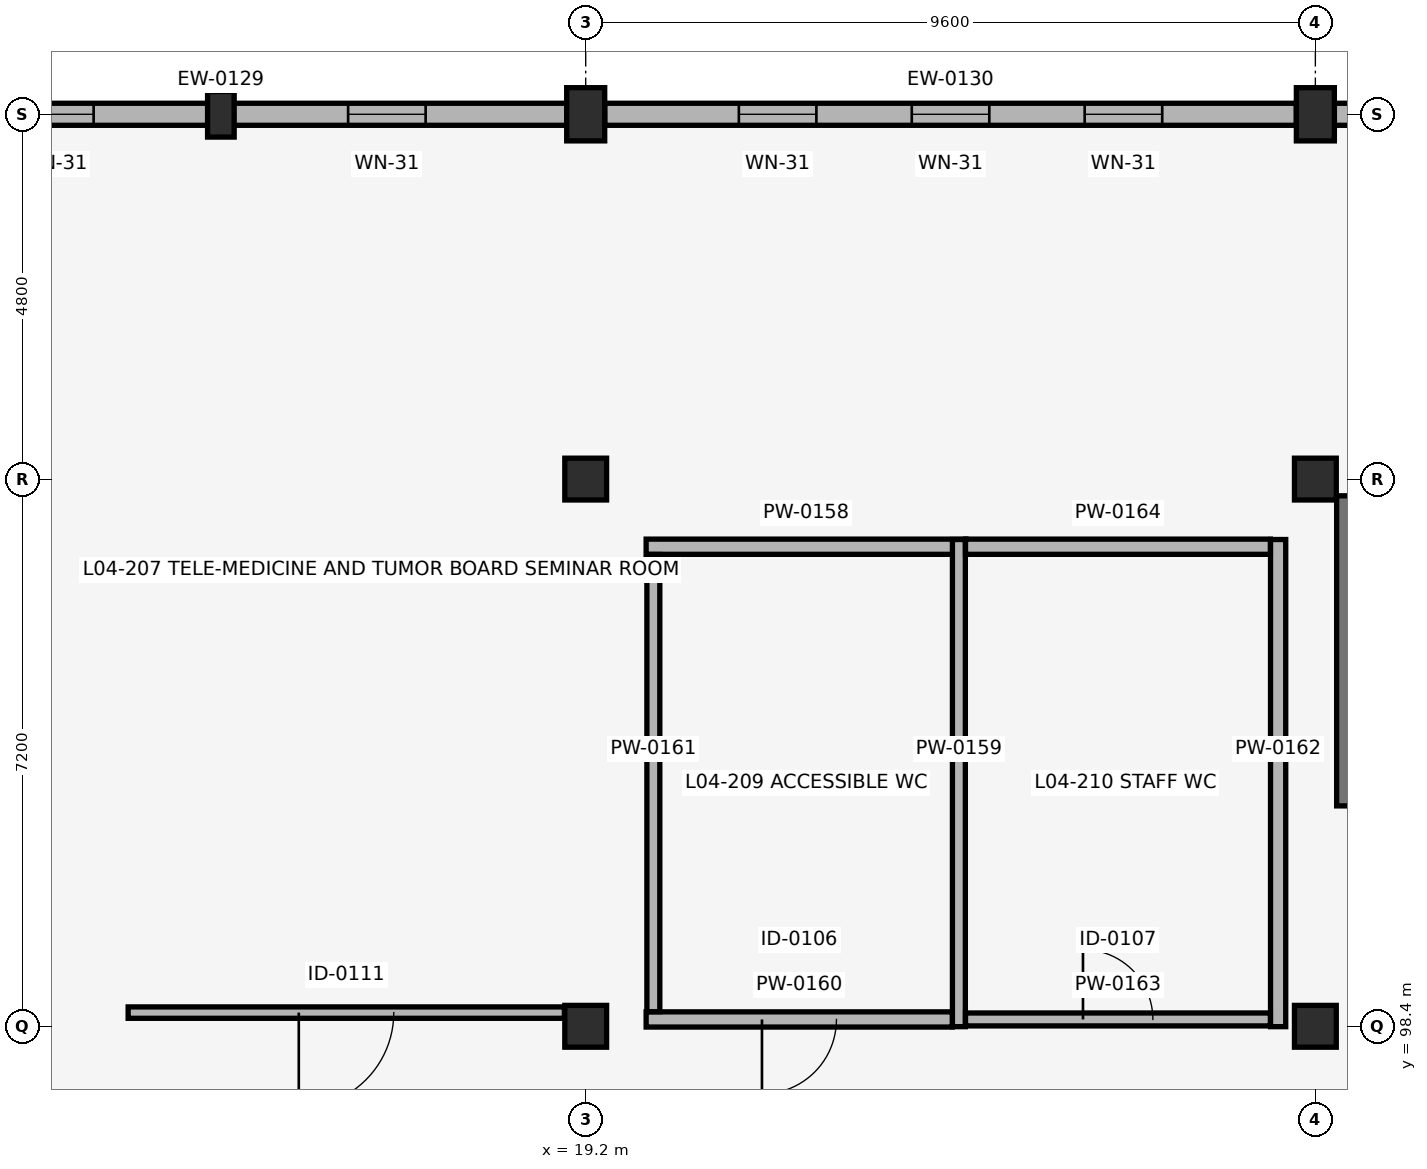
"""IFC4 building model, lengths in metres.
Left out: names, types, materials, properties, quantities, classifications, styles, units other than length and angle.
Written with IfcOpenShell. Run it as: python <this file> out.ifc"""

import sys

from ifc_helpers import new_model, si_unit, direction, frame, frame_2d, origin, origin_2d, place, context, subcontext, project, spatial, rectangle, extrude, element, fill, save


model = new_model("IFC4")
c1 = context("Model", 3, precision=1e-05, world=origin(), true_north=direction((0.0, 1.0)))
c2 = subcontext(c1, "Body", "Model", "MODEL_VIEW")
j1 = project(units=[si_unit("LENGTHUNIT", "METRE"), si_unit("PLANEANGLEUNIT", "RADIAN")], contexts=[c1])
p1 = place(None, origin())
s1 = spatial("IfcSite", under=j1, at=p1, CompositionType="ELEMENT")
p2 = place(p1, origin())
s2 = spatial("IfcBuilding", under=s1, at=p2, CompositionType="ELEMENT")
p3 = place(p2, frame((0.0, 0.0, 16.66)))
s3 = spatial("IfcBuildingStorey", under=s2, at=p3, CompositionType="ELEMENT", Elevation=16.66)
for number, where, z_axis, x_axis in (
    (1, (19.2, 98.4, 0.0), (0.0, 0.0, 1.0), (1.0, 0.0, 0.0)),
    (2, (19.2, 105.6, 0.0), (0.0, 0.0, 1.0), (1.0, 0.0, 0.0)),
):
    element("IfcColumn", number, at=place(p3, frame(where, z_axis=z_axis, x_axis=x_axis)), inside=s3, PredefinedType="COLUMN", context=c2, shape_type="SweptSolid", body=[
        extrude(rectangle(XDim=0.55, YDim=0.55, at=origin_2d()), origin(), (0.0, 0.0, 1.0), 4.08),
    ])
p4 = place(p3, frame((19.2, 110.4, 0.0), z_axis=(0.0, 0.0, 1.0), x_axis=(1.0, 0.0, 0.0)))
e3 = element("IfcColumn", 3, at=p4, inside=s3, PredefinedType="COLUMN", context=c2, shape_type="SweptSolid", body=[
    extrude(rectangle(XDim=0.5, YDim=0.7, at=origin_2d()), origin(), (0.0, 0.0, 1.0), 4.08),
])
for number, where, z_axis, x_axis in (
    (4, (28.8, 98.4, 0.0), (0.0, 0.0, 1.0), (1.0, 0.0, 0.0)),
    (5, (28.8, 105.6, 0.0), (0.0, 0.0, 1.0), (1.0, 0.0, 0.0)),
):
    element("IfcColumn", number, at=place(p3, frame(where, z_axis=z_axis, x_axis=x_axis)), inside=s3, PredefinedType="COLUMN", context=c2, shape_type="SweptSolid", body=[
        extrude(rectangle(XDim=0.55, YDim=0.55, at=origin_2d()), origin(), (0.0, 0.0, 1.0), 4.08),
    ])
p5 = place(p3, frame((28.8, 110.4, 0.0), z_axis=(0.0, 0.0, 1.0), x_axis=(1.0, 0.0, 0.0)))
e6 = element("IfcColumn", 6, at=p5, inside=s3, PredefinedType="COLUMN", context=c2, shape_type="SweptSolid", body=[
    extrude(rectangle(XDim=0.5, YDim=0.7, at=origin_2d()), origin(), (0.0, 0.0, 1.0), 4.08),
])
p6 = place(p3, frame((14.4, 110.4, 0.0), z_axis=(0.0, 0.0, 1.0), x_axis=(1.0, 0.0, 0.0)))
e7 = element("IfcColumn", 7, at=p6, inside=s3, PredefinedType="PILASTER", context=c2, shape_type="SweptSolid", body=[
    extrude(rectangle(XDim=0.35, YDim=0.6, at=origin_2d()), origin(), (0.0, 0.0, 1.0), 4.08),
])
p7 = place(p3, frame((18.95, 110.4, 0.0), z_axis=(0.0, 0.0, 1.0), x_axis=(-1.0, 0.0, 0.0)))
e8 = element("IfcWall", 8, at=p7, inside=s3, PredefinedType="SOLIDWALL", context=c2, shape_type="SweptSolid", body=[
    extrude(rectangle(XDim=9.1, YDim=0.29, at=frame_2d((4.55, 0.0))), origin(), (0.0, 0.0, 1.0), 3.08),
])
p8 = place(p7, frame((1.856, 0.0, 0.88)))
e9 = element("IfcOpeningElement", 9, at=p8, cuts=e8, PredefinedType="OPENING", context=c2, shape_type="SweptSolid", body=[
    extrude(rectangle(XDim=1.02, YDim=1.88, at=frame_2d((0.51, 0.94))), frame((0.0, 0.155, 0.0), z_axis=(0.0, -1.0, 0.0), x_axis=(1.0, 0.0, 0.0)), (0.0, 0.0, 1.0), 0.31),
])
p9 = place(p7, frame((6.224, 0.0, 0.88)))
e10 = element("IfcOpeningElement", 10, at=p9, cuts=e8, PredefinedType="OPENING", context=c2, shape_type="SweptSolid", body=[
    extrude(rectangle(XDim=1.02, YDim=1.88, at=frame_2d((0.51, 0.94))), frame((0.0, 0.155, 0.0), z_axis=(0.0, -1.0, 0.0), x_axis=(1.0, 0.0, 0.0)), (0.0, 0.0, 1.0), 0.31),
])
p10 = place(p3, frame((28.55, 110.4, 0.0), z_axis=(0.0, 0.0, 1.0), x_axis=(-1.0, 0.0, 0.0)))
e11 = element("IfcWall", 11, at=p10, inside=s3, PredefinedType="SOLIDWALL", context=c2, shape_type="SweptSolid", body=[
    extrude(rectangle(XDim=9.1, YDim=0.29, at=frame_2d((4.55, 0.0))), origin(), (0.0, 0.0, 1.0), 3.08),
])
p11 = place(p10, frame((1.765, 0.0, 0.88)))
e12 = element("IfcOpeningElement", 12, at=p11, cuts=e11, PredefinedType="OPENING", context=c2, shape_type="SweptSolid", body=[
    extrude(rectangle(XDim=1.02, YDim=1.88, at=frame_2d((0.51, 0.94))), frame((0.0, 0.155, 0.0), z_axis=(0.0, -1.0, 0.0), x_axis=(1.0, 0.0, 0.0)), (0.0, 0.0, 1.0), 0.31),
])
p12 = place(p10, frame((4.04, 0.0, 0.88)))
e13 = element("IfcOpeningElement", 13, at=p12, cuts=e11, PredefinedType="OPENING", context=c2, shape_type="SweptSolid", body=[
    extrude(rectangle(XDim=1.02, YDim=1.88, at=frame_2d((0.51, 0.94))), frame((0.0, 0.155, 0.0), z_axis=(0.0, -1.0, 0.0), x_axis=(1.0, 0.0, 0.0)), (0.0, 0.0, 1.0), 0.31),
])
p13 = place(p10, frame((6.315, 0.0, 0.88)))
e14 = element("IfcOpeningElement", 14, at=p13, cuts=e11, PredefinedType="OPENING", context=c2, shape_type="SweptSolid", body=[
    extrude(rectangle(XDim=1.02, YDim=1.88, at=frame_2d((0.51, 0.94))), frame((0.0, 0.155, 0.0), z_axis=(0.0, -1.0, 0.0), x_axis=(1.0, 0.0, 0.0)), (0.0, 0.0, 1.0), 0.31),
])
p14 = place(p3, frame((38.15, 110.4, 0.0), z_axis=(0.0, 0.0, 1.0), x_axis=(-1.0, 0.0, 0.0)))
e15 = element("IfcWall", 15, at=p14, inside=s3, PredefinedType="SOLIDWALL", context=c2, shape_type="SweptSolid", body=[
    extrude(rectangle(XDim=9.1, YDim=0.29, at=frame_2d((4.55, 0.0))), origin(), (0.0, 0.0, 1.0), 3.08),
])
p15 = place(p14, frame((1.856, 0.0, 0.88)))
e16 = element("IfcOpeningElement", 16, at=p15, cuts=e15, PredefinedType="OPENING", context=c2, shape_type="SweptSolid", body=[
    extrude(rectangle(XDim=1.02, YDim=1.88, at=frame_2d((0.51, 0.94))), frame((0.0, 0.155, 0.0), z_axis=(0.0, -1.0, 0.0), x_axis=(1.0, 0.0, 0.0)), (0.0, 0.0, 1.0), 0.31),
])
p16 = place(p14, frame((6.224, 0.0, 0.88)))
e17 = element("IfcOpeningElement", 17, at=p16, cuts=e15, PredefinedType="OPENING", context=c2, shape_type="SweptSolid", body=[
    extrude(rectangle(XDim=1.02, YDim=1.88, at=frame_2d((0.51, 0.94))), frame((0.0, 0.155, 0.0), z_axis=(0.0, -1.0, 0.0), x_axis=(1.0, 0.0, 0.0)), (0.0, 0.0, 1.0), 0.31),
])
p17 = place(p3, frame((29.22, 101.3, 0.0), z_axis=(0.0, 0.0, 1.0), x_axis=(0.0, 1.0, 0.0)))
e18 = element("IfcWall", 18, at=p17, inside=s3, PredefinedType="SHEAR", context=c2, shape_type="SweptSolid", body=[
    extrude(rectangle(XDim=4.08, YDim=0.28, at=frame_2d((2.04, 0.0))), origin(), (0.0, 0.0, 1.0), 3.8),
])
p18 = place(p3, frame((19.995, 104.71, 0.0), z_axis=(0.0, 0.0, 1.0), x_axis=(1.0, 0.0, 0.0)))
e19 = element("IfcWall", 19, at=p18, inside=s3, PredefinedType="PLUMBINGWALL", context=c2, shape_type="SweptSolid", body=[
    extrude(rectangle(XDim=4.21, YDim=0.2, at=frame_2d((2.105, 0.0))), origin(), (0.0, 0.0, 1.0), 3.12),
])
p19 = place(p3, frame((24.11, 98.395, 0.0), z_axis=(0.0, 0.0, 1.0), x_axis=(0.0, 1.0, 0.0)))
e20 = element("IfcWall", 20, at=p19, inside=s3, PredefinedType="PLUMBINGWALL", context=c2, shape_type="SweptSolid", body=[
    extrude(rectangle(XDim=6.41, YDim=0.17, at=frame_2d((3.205, 0.0))), origin(), (0.0, 0.0, 1.0), 3.12),
])
p20 = place(p3, frame((19.995, 98.49, 0.0), z_axis=(0.0, 0.0, 1.0), x_axis=(1.0, 0.0, 0.0)))
e21 = element("IfcWall", 21, at=p20, inside=s3, PredefinedType="PLUMBINGWALL", context=c2, shape_type="SweptSolid", body=[
    extrude(rectangle(XDim=4.028, YDim=0.2, at=frame_2d((2.014, 0.0))), origin(), (0.0, 0.0, 1.0), 3.12),
])
p21 = place(p20, frame((1.524, 0.0, 0.0)))
e22 = element("IfcOpeningElement", 22, at=p21, cuts=e21, PredefinedType="OPENING", context=c2, shape_type="SweptSolid", body=[
    extrude(rectangle(XDim=0.98, YDim=2.08, at=frame_2d((0.49, 1.04))), frame((0.0, 0.11, 0.0), z_axis=(0.0, -1.0, 0.0), x_axis=(1.0, 0.0, 0.0)), (0.0, 0.0, 1.0), 0.22),
])
p22 = place(p3, frame((20.09, 98.592, 0.0), z_axis=(0.0, 0.0, 1.0), x_axis=(0.0, 1.0, 0.0)))
e23 = element("IfcWall", 23, at=p22, inside=s3, PredefinedType="PLUMBINGWALL", context=c2, shape_type="SweptSolid", body=[
    extrude(rectangle(XDim=6.016, YDim=0.17, at=frame_2d((3.008, 0.0))), origin(), (0.0, 0.0, 1.0), 3.12),
])
p23 = place(p3, frame((28.31, 98.395, 0.0), z_axis=(0.0, 0.0, 1.0), x_axis=(0.0, 1.0, 0.0)))
e24 = element("IfcWall", 24, at=p23, inside=s3, PredefinedType="PLUMBINGWALL", context=c2, shape_type="SweptSolid", body=[
    extrude(rectangle(XDim=6.41, YDim=0.2, at=frame_2d((3.205, 0.0))), origin(), (0.0, 0.0, 1.0), 3.12),
])
p24 = place(p3, frame((24.197, 98.49, 0.0), z_axis=(0.0, 0.0, 1.0), x_axis=(1.0, 0.0, 0.0)))
e25 = element("IfcWall", 25, at=p24, inside=s3, PredefinedType="PLUMBINGWALL", context=c2, shape_type="SweptSolid", body=[
    extrude(rectangle(XDim=4.011, YDim=0.17, at=frame_2d((2.005, 0.0))), origin(), (0.0, 0.0, 1.0), 3.12),
])
p25 = place(p24, frame((1.545, 0.0, 0.0)))
e26 = element("IfcOpeningElement", 26, at=p25, cuts=e25, PredefinedType="OPENING", context=c2, shape_type="SweptSolid", body=[
    extrude(rectangle(XDim=0.92, YDim=2.08, at=frame_2d((0.46, 1.04))), frame((0.0, 0.095, 0.0), z_axis=(0.0, -1.0, 0.0), x_axis=(1.0, 0.0, 0.0)), (0.0, 0.0, 1.0), 0.19),
])
p26 = place(p3, frame((24.197, 104.71, 0.0), z_axis=(0.0, 0.0, 1.0), x_axis=(1.0, 0.0, 0.0)))
e27 = element("IfcWall", 27, at=p26, inside=s3, PredefinedType="PLUMBINGWALL", context=c2, shape_type="SweptSolid", body=[
    extrude(rectangle(XDim=4.011, YDim=0.2, at=frame_2d((2.005, 0.0))), origin(), (0.0, 0.0, 1.0), 3.12),
])
p27 = place(p3, frame((13.18, 98.58, 0.0), z_axis=(0.0, 0.0, 1.0), x_axis=(1.0, 0.0, 0.0)))
e28 = element("IfcWall", 28, at=p27, inside=s3, PredefinedType="PARTITIONING", context=c2, shape_type="SweptSolid", body=[
    extrude(rectangle(XDim=5.74, YDim=0.15, at=frame_2d((2.87, 0.0))), origin(), (0.0, 0.0, 1.0), 3.12),
])
p28 = place(p27, frame((2.245, 0.0, 0.0)))
e29 = element("IfcOpeningElement", 29, at=p28, cuts=e28, PredefinedType="OPENING", context=c2, shape_type="SweptSolid", body=[
    extrude(rectangle(XDim=1.25, YDim=2.12, at=frame_2d((0.625, 1.06))), frame((0.0, 0.085, 0.0), z_axis=(0.0, -1.0, 0.0), x_axis=(1.0, 0.0, 0.0)), (0.0, 0.0, 1.0), 0.17),
])
p29 = place(p8, origin())
e30 = element("IfcWindow", 30, at=p29, inside=s3, PartitioningType="SINGLE_PANEL", PredefinedType="WINDOW", context=c2, shape_type="SweptSolid", body=[
    extrude(rectangle(XDim=1.02, YDim=1.88, at=frame_2d((0.51, 0.94))), frame((0.0, 0.03, 0.0), z_axis=(0.0, -1.0, 0.0), x_axis=(1.0, 0.0, 0.0)), (0.0, 0.0, 1.0), 0.06),
])
fill(e9, e30)
p30 = place(p9, origin())
e31 = element("IfcWindow", 31, at=p30, inside=s3, PartitioningType="SINGLE_PANEL", PredefinedType="WINDOW", context=c2, shape_type="SweptSolid", body=[
    extrude(rectangle(XDim=1.02, YDim=1.88, at=frame_2d((0.51, 0.94))), frame((0.0, 0.03, 0.0), z_axis=(0.0, -1.0, 0.0), x_axis=(1.0, 0.0, 0.0)), (0.0, 0.0, 1.0), 0.06),
])
fill(e10, e31)
p31 = place(p11, origin())
e32 = element("IfcWindow", 32, at=p31, inside=s3, PartitioningType="SINGLE_PANEL", PredefinedType="WINDOW", context=c2, shape_type="SweptSolid", body=[
    extrude(rectangle(XDim=1.02, YDim=1.88, at=frame_2d((0.51, 0.94))), frame((0.0, 0.03, 0.0), z_axis=(0.0, -1.0, 0.0), x_axis=(1.0, 0.0, 0.0)), (0.0, 0.0, 1.0), 0.06),
])
fill(e12, e32)
p32 = place(p12, origin())
e33 = element("IfcWindow", 33, at=p32, inside=s3, PartitioningType="SINGLE_PANEL", PredefinedType="WINDOW", context=c2, shape_type="SweptSolid", body=[
    extrude(rectangle(XDim=1.02, YDim=1.88, at=frame_2d((0.51, 0.94))), frame((0.0, 0.03, 0.0), z_axis=(0.0, -1.0, 0.0), x_axis=(1.0, 0.0, 0.0)), (0.0, 0.0, 1.0), 0.06),
])
fill(e13, e33)
p33 = place(p13, origin())
e34 = element("IfcWindow", 34, at=p33, inside=s3, PartitioningType="SINGLE_PANEL", PredefinedType="WINDOW", context=c2, shape_type="SweptSolid", body=[
    extrude(rectangle(XDim=1.02, YDim=1.88, at=frame_2d((0.51, 0.94))), frame((0.0, 0.03, 0.0), z_axis=(0.0, -1.0, 0.0), x_axis=(1.0, 0.0, 0.0)), (0.0, 0.0, 1.0), 0.06),
])
fill(e14, e34)
p34 = place(p21, origin())
e35 = element("IfcDoor", 35, at=p34, inside=s3, OperationType="SINGLE_SWING_RIGHT", PredefinedType="DOOR", context=c2, shape_type="SweptSolid", body=[
    extrude(rectangle(XDim=0.98, YDim=2.08, at=frame_2d((0.49, 1.04))), frame((0.0, 0.025, 0.0), z_axis=(0.0, -1.0, 0.0), x_axis=(1.0, 0.0, 0.0)), (0.0, 0.0, 1.0), 0.05),
])
fill(e22, e35)
p35 = place(p25, origin())
e36 = element("IfcDoor", 36, at=p35, inside=s3, OperationType="SINGLE_SWING_LEFT", PredefinedType="DOOR", context=c2, shape_type="SweptSolid", body=[
    extrude(rectangle(XDim=0.92, YDim=2.08, at=frame_2d((0.46, 1.04))), frame((0.0, 0.025, 0.0), z_axis=(0.0, -1.0, 0.0), x_axis=(1.0, 0.0, 0.0)), (0.0, 0.0, 1.0), 0.05),
])
fill(e26, e36)
p36 = place(p28, origin())
e37 = element("IfcDoor", 37, at=p36, inside=s3, OperationType="SINGLE_SWING_RIGHT", PredefinedType="DOOR", context=c2, shape_type="SweptSolid", body=[
    extrude(rectangle(XDim=1.25, YDim=2.12, at=frame_2d((0.625, 1.06))), frame((0.0, 0.025, 0.0), z_axis=(0.0, -1.0, 0.0), x_axis=(1.0, 0.0, 0.0)), (0.0, 0.0, 1.0), 0.05),
])
fill(e29, e37)
save(model, sys.argv[1])
